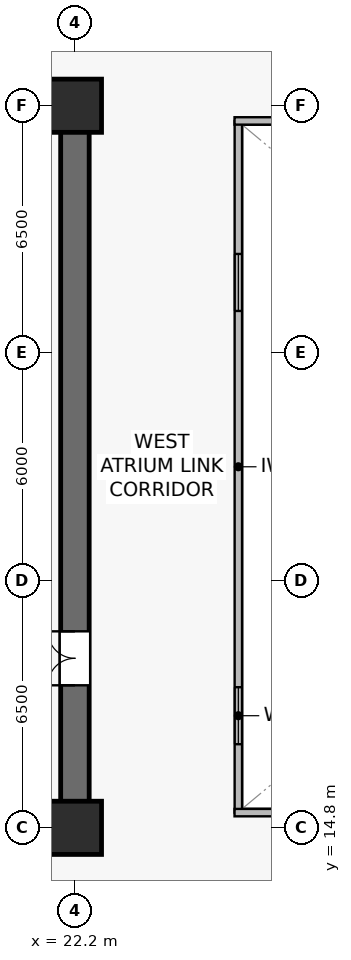
"""IFC4 building model, lengths in metres.
Left out: names, types, materials, properties, quantities, classifications, styles, units other than length and angle.
Written with IfcOpenShell. Run it as: python <this file> out.ifc"""

import sys

from ifc_helpers import new_model, si_unit, direction, frame, frame_2d, origin, origin_2d, place, context, subcontext, project, spatial, rectangle, extrude, source, transform, mapped, element, fill, save


model = new_model("IFC4")
c1 = context("Model", 3, precision=1e-05, world=origin(), true_north=direction((0.0, 1.0)))
c2 = subcontext(c1, "Body", "Model", "MODEL_VIEW")
j1 = project(units=[si_unit("LENGTHUNIT", "METRE"), si_unit("PLANEANGLEUNIT", "RADIAN")], contexts=[c1])
p1 = place(None, origin())
s1 = spatial("IfcSite", under=j1, at=p1, CompositionType="ELEMENT")
p2 = place(p1, origin())
s2 = spatial("IfcBuilding", under=s1, at=p2, CompositionType="ELEMENT")
p3 = place(p2, frame((0.0, 0.0, 33.4)))
s3 = spatial("IfcBuildingStorey", under=s2, at=p3, CompositionType="ELEMENT", Elevation=33.4)
p4 = place(p3, frame((7.025, 14.8, 0.0), z_axis=(0.0, 0.0, 1.0), x_axis=(1.0, 0.0, 0.0)))
e1 = element("IfcWall", 1, at=p4, inside=s3, PredefinedType="SHEAR", context=c2, shape_type="SweptSolid", body=[
    extrude(rectangle(XDim=15.55, YDim=0.75, at=frame_2d((7.775, 0.0))), origin(), (0.0, 0.0, 1.0), 3.78),
])
p5 = place(p3, frame((7.025, 33.8, 0.0), z_axis=(0.0, 0.0, 1.0), x_axis=(1.0, 0.0, 0.0)))
e2 = element("IfcWall", 2, at=p5, inside=s3, PredefinedType="SHEAR", context=c2, shape_type="SweptSolid", body=[
    extrude(rectangle(XDim=15.55, YDim=0.75, at=frame_2d((7.775, 0.0))), origin(), (0.0, 0.0, 1.0), 3.78),
])
p6 = place(p5, frame((5.3, 0.0, 0.0)))
e3 = element("IfcOpeningElement", 3, at=p6, cuts=e2, PredefinedType="OPENING", context=c2, shape_type="SweptSolid", body=[
    extrude(rectangle(XDim=0.95, YDim=2.15, at=frame_2d((0.475, 1.075))), frame((0.0, 0.385, 0.0), z_axis=(0.0, -1.0, 0.0), x_axis=(1.0, 0.0, 0.0)), (0.0, 0.0, 1.0), 0.77),
])
p7 = place(p5, frame((7.815, 0.0, 0.0)))
e4 = element("IfcOpeningElement", 4, at=p7, cuts=e2, PredefinedType="OPENING", context=c2, shape_type="SweptSolid", body=[
    extrude(rectangle(XDim=0.95, YDim=2.15, at=frame_2d((0.475, 1.075))), frame((0.0, 0.385, 0.0), z_axis=(0.0, -1.0, 0.0), x_axis=(1.0, 0.0, 0.0)), (0.0, 0.0, 1.0), 0.77),
])
p8 = place(p5, frame((10.365, 0.0, 0.0)))
e5 = element("IfcOpeningElement", 5, at=p8, cuts=e2, PredefinedType="OPENING", context=c2, shape_type="SweptSolid", body=[
    extrude(rectangle(XDim=0.95, YDim=2.15, at=frame_2d((0.475, 1.075))), frame((0.0, 0.385, 0.0), z_axis=(0.0, -1.0, 0.0), x_axis=(1.0, 0.0, 0.0)), (0.0, 0.0, 1.0), 0.77),
])
p9 = place(p5, frame((12.915, 0.0, 0.0)))
e6 = element("IfcOpeningElement", 6, at=p9, cuts=e2, PredefinedType="OPENING", context=c2, shape_type="SweptSolid", body=[
    extrude(rectangle(XDim=0.95, YDim=2.15, at=frame_2d((0.475, 1.075))), frame((0.0, 0.385, 0.0), z_axis=(0.0, -1.0, 0.0), x_axis=(1.0, 0.0, 0.0)), (0.0, 0.0, 1.0), 0.77),
])
p10 = place(p3, frame((22.2, 15.175, 0.0), z_axis=(0.0, 0.0, 1.0), x_axis=(0.0, 1.0, 0.0)))
e7 = element("IfcWall", 7, at=p10, inside=s3, PredefinedType="SHEAR", context=c2, shape_type="SweptSolid", body=[
    extrude(rectangle(XDim=18.25, YDim=0.75, at=frame_2d((9.125, 0.0))), origin(), (0.0, 0.0, 1.0), 3.78),
])
p11 = place(p10, frame((3.375, 0.0, 0.0)))
e8 = element("IfcOpeningElement", 8, at=p11, cuts=e7, PredefinedType="OPENING", context=c2, shape_type="SweptSolid", body=[
    extrude(rectangle(XDim=1.42, YDim=2.2, at=frame_2d((0.71, 1.1))), frame((0.0, 0.385, 0.0), z_axis=(0.0, -1.0, 0.0), x_axis=(1.0, 0.0, 0.0)), (0.0, 0.0, 1.0), 0.77),
])
m1 = source(origin(), c2, "Body", "SweptSolid", [
    extrude(rectangle(XDim=1.4, YDim=1.4, at=origin_2d()), origin(), (0.0, 0.0, 1.0), 4.1),
])
for number, where, z_axis, x_axis in (
    (9, (22.2, 14.8, 0.0), (0.0, 0.0, 1.0), (1.0, 0.0, 0.0)),
    (10, (22.2, 33.8, 0.0), (0.0, 0.0, 1.0), (1.0, 0.0, 0.0)),
):
    element("IfcColumn", number, at=place(p3, frame(where, z_axis=z_axis, x_axis=x_axis)), inside=s3, PredefinedType="COLUMN", context=c2, shape_type="MappedRepresentation", body=[
        mapped(m1, transform((0.0, 0.0, 0.0), scale=1.0)),
    ])
p12 = place(p3, frame((26.5, 15.2, 0.0), z_axis=(0.0, 0.0, 1.0), x_axis=(0.0, 1.0, 0.0)))
e11 = element("IfcWall", 11, at=p12, inside=s3, PredefinedType="SOLIDWALL", context=c2, shape_type="SweptSolid", body=[
    extrude(rectangle(XDim=18.2, YDim=0.195, at=frame_2d((9.1, 0.0))), origin(), (0.0, 0.0, 1.0), 3.78),
])
p13 = place(p12, frame((1.8, 0.0, 0.9)))
e12 = element("IfcOpeningElement", 12, at=p13, cuts=e11, PredefinedType="OPENING", context=c2, shape_type="SweptSolid", body=[
    extrude(rectangle(XDim=1.5, YDim=1.4, at=frame_2d((0.75, 0.7))), frame((0.0, 0.107, 0.0), z_axis=(0.0, -1.0, 0.0), x_axis=(1.0, 0.0, 0.0)), (0.0, 0.0, 1.0), 0.215),
])
p14 = place(p12, frame((13.2, 0.0, 0.9)))
e13 = element("IfcOpeningElement", 13, at=p14, cuts=e11, PredefinedType="OPENING", context=c2, shape_type="SweptSolid", body=[
    extrude(rectangle(XDim=1.5, YDim=1.4, at=frame_2d((0.75, 0.7))), frame((0.0, 0.107, 0.0), z_axis=(0.0, -1.0, 0.0), x_axis=(1.0, 0.0, 0.0)), (0.0, 0.0, 1.0), 0.215),
])
for number, where, z_axis, x_axis in (
    (14, (26.4, 15.2, 0.0), (0.0, 0.0, 1.0), (1.0, 0.0, 0.0)),
    (15, (26.4, 33.4, 0.0), (0.0, 0.0, 1.0), (1.0, 0.0, 0.0)),
):
    element("IfcWall", number, at=place(p3, frame(where, z_axis=z_axis, x_axis=x_axis)), inside=s3, PredefinedType="SOLIDWALL", context=c2, shape_type="SweptSolid", body=[
        extrude(rectangle(XDim=22.0, YDim=0.195, at=frame_2d((11.0, 0.0))), origin(), (0.0, 0.0, 1.0), 3.78),
    ])
m2 = source(origin(), c2, "Body", "SweptSolid", [
    extrude(rectangle(XDim=1.5, YDim=1.4, at=frame_2d((0.75, 0.7))), frame((0.0, 0.03, 0.0), z_axis=(0.0, -1.0, 0.0), x_axis=(1.0, 0.0, 0.0)), (0.0, 0.0, 1.0), 0.06),
])
p15 = place(p13, origin())
e16 = element("IfcWindow", 16, at=p15, inside=s3, PartitioningType="SINGLE_PANEL", PredefinedType="WINDOW", context=c2, shape_type="MappedRepresentation", body=[
    mapped(m2, transform((0.0, 0.0, 0.0), scale=1.0)),
])
fill(e12, e16)
p16 = place(p14, origin())
e17 = element("IfcWindow", 17, at=p16, inside=s3, PartitioningType="SINGLE_PANEL", PredefinedType="WINDOW", context=c2, shape_type="MappedRepresentation", body=[
    mapped(m2, transform((0.0, 0.0, 0.0), scale=1.0)),
])
fill(e13, e17)
m3 = source(origin(), c2, "Body", "SweptSolid", [
    extrude(rectangle(XDim=1.42, YDim=2.2, at=frame_2d((0.71, 1.1))), frame((0.0, 0.025, 0.0), z_axis=(0.0, -1.0, 0.0), x_axis=(1.0, 0.0, 0.0)), (0.0, 0.0, 1.0), 0.05),
])
p17 = place(p11, origin())
e18 = element("IfcDoor", 18, at=p17, inside=s3, OperationType="DOUBLE_DOOR_SINGLE_SWING", PredefinedType="DOOR", context=c2, shape_type="MappedRepresentation", body=[
    mapped(m3, transform((0.0, 0.0, 0.0), scale=1.0)),
])
fill(e8, e18)
save(model, sys.argv[1])
